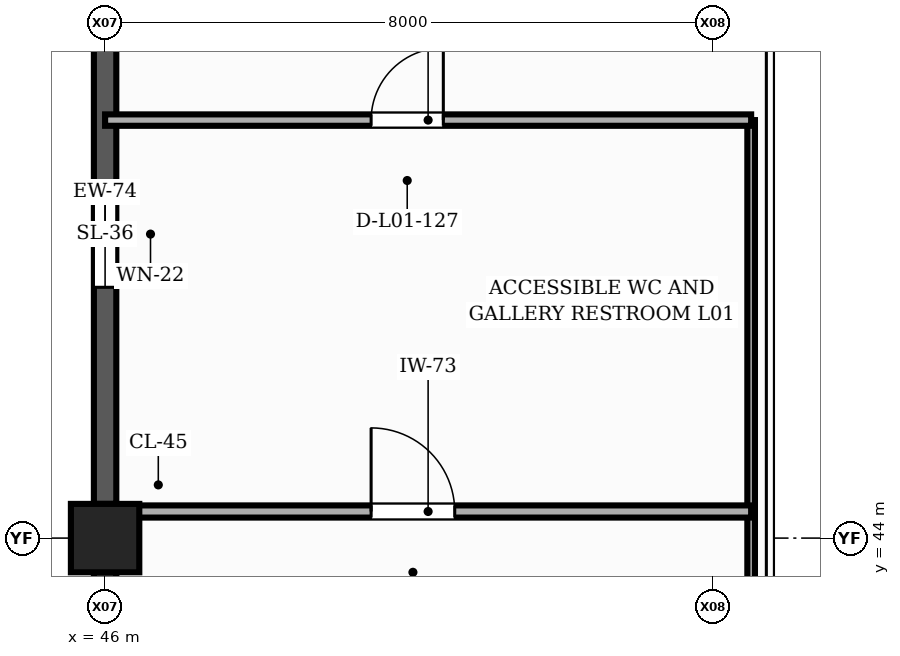
"""IFC4 building model, lengths in metres.
Left out: names, types, materials, properties, quantities, classifications, styles, units other than length and angle.
Written with IfcOpenShell. Run it as: python <this file> out.ifc"""

import sys

from ifc_helpers import new_model, si_unit, direction, frame, frame_2d, origin, origin_2d, place, context, subcontext, project, spatial, rectangle, extrude, element, fill, save


model = new_model("IFC4")
c1 = context("Model", 3, precision=1e-05, world=origin(), true_north=direction((0.0, 1.0)))
c2 = subcontext(c1, "Body", "Model", "MODEL_VIEW")
j1 = project(units=[si_unit("LENGTHUNIT", "METRE"), si_unit("PLANEANGLEUNIT", "RADIAN")], contexts=[c1])
p1 = place(None, origin())
s1 = spatial("IfcSite", under=j1, at=p1, CompositionType="ELEMENT")
p2 = place(p1, origin())
s2 = spatial("IfcBuilding", under=s1, at=p2, CompositionType="ELEMENT")
p3 = place(p2, frame((0.0, 0.0, 4.8)))
s3 = spatial("IfcBuildingStorey", under=s2, at=p3, CompositionType="ELEMENT", Elevation=4.8)
p4 = place(p3, frame((46.0, 44.0, 0.0), z_axis=(0.0, 0.0, 1.0), x_axis=(1.0, 0.0, 0.0)))
e1 = element("IfcColumn", 1, at=p4, inside=s3, PredefinedType="COLUMN", context=c2, shape_type="SweptSolid", body=[
    extrude(rectangle(XDim=0.9, YDim=0.9, at=origin_2d()), origin(), (0.0, 0.0, 1.0), 4.2),
])
p5 = place(p3, frame((46.0, 51.55, 0.0), z_axis=(0.0, 0.0, 1.0), x_axis=(0.0, -1.0, 0.0)))
e2 = element("IfcWall", 2, at=p5, inside=s3, PredefinedType="SOLIDWALL", context=c2, shape_type="SweptSolid", body=[
    extrude(rectangle(XDim=7.1, YDim=0.295, at=frame_2d((3.55, 0.0))), origin(), (0.0, 0.0, 1.0), 3.91),
])
p6 = place(p5, frame((2.85, 0.0, 0.9)))
e3 = element("IfcOpeningElement", 3, at=p6, cuts=e2, PredefinedType="OPENING", context=c2, shape_type="SweptSolid", body=[
    extrude(rectangle(XDim=1.4, YDim=1.4, at=frame_2d((0.7, 0.7))), frame((0.0, 0.157, 0.0), z_axis=(0.0, -1.0, 0.0), x_axis=(1.0, 0.0, 0.0)), (0.0, 0.0, 1.0), 0.315),
])
p7 = place(p3, frame((46.0, 43.55, 0.0), z_axis=(0.0, 0.0, 1.0), x_axis=(0.0, -1.0, 0.0)))
e4 = element("IfcWall", 4, at=p7, inside=s3, PredefinedType="SOLIDWALL", context=c2, shape_type="SweptSolid", body=[
    extrude(rectangle(XDim=7.1, YDim=0.295, at=frame_2d((3.55, 0.0))), origin(), (0.0, 0.0, 1.0), 3.91),
])
p8 = place(p7, frame((2.85, 0.0, 0.9)))
e5 = element("IfcOpeningElement", 5, at=p8, cuts=e4, PredefinedType="OPENING", context=c2, shape_type="SweptSolid", body=[
    extrude(rectangle(XDim=1.4, YDim=1.4, at=frame_2d((0.7, 0.7))), frame((0.0, 0.157, 0.0), z_axis=(0.0, -1.0, 0.0), x_axis=(1.0, 0.0, 0.0)), (0.0, 0.0, 1.0), 0.315),
])
p9 = place(p3, frame((54.5, 36.0, 0.0), z_axis=(0.0, 0.0, 1.0), x_axis=(0.0, 1.0, 0.0)))
e6 = element("IfcWall", 6, at=p9, inside=s3, PredefinedType="PARTITIONING", context=c2, shape_type="SweptSolid", body=[
    extrude(rectangle(XDim=13.5, YDim=0.1, at=frame_2d((6.75, 0.0))), origin(), (0.0, 0.0, 1.0), 2.945),
])
p10 = place(p3, frame((46.0, 44.35, 0.0), z_axis=(0.0, 0.0, 1.0), x_axis=(1.0, 0.0, 0.0)))
e7 = element("IfcWall", 7, at=p10, inside=s3, PredefinedType="PARTITIONING", context=c2, shape_type="SweptSolid", body=[
    extrude(rectangle(XDim=8.5, YDim=0.16, at=frame_2d((4.25, 0.0))), origin(), (0.0, 0.0, 1.0), 2.945),
])
p11 = place(p10, frame((3.5, 0.0, 0.0)))
e8 = element("IfcOpeningElement", 8, at=p11, cuts=e7, PredefinedType="OPENING", context=c2, shape_type="SweptSolid", body=[
    extrude(rectangle(XDim=1.1, YDim=2.1, at=frame_2d((0.55, 1.05))), frame((0.0, 0.09, 0.0), z_axis=(0.0, -1.0, 0.0), x_axis=(1.0, 0.0, 0.0)), (0.0, 0.0, 1.0), 0.18),
])
p12 = place(p3, frame((46.0, 49.5, 0.0), z_axis=(0.0, 0.0, 1.0), x_axis=(1.0, 0.0, 0.0)))
e9 = element("IfcWall", 9, at=p12, inside=s3, PredefinedType="PARTITIONING", context=c2, shape_type="SweptSolid", body=[
    extrude(rectangle(XDim=8.5, YDim=0.15, at=frame_2d((4.25, 0.0))), origin(), (0.0, 0.0, 1.0), 2.945),
])
p13 = place(p12, frame((3.5, 0.0, 0.0)))
e10 = element("IfcOpeningElement", 10, at=p13, cuts=e9, PredefinedType="OPENING", context=c2, shape_type="SweptSolid", body=[
    extrude(rectangle(XDim=0.95, YDim=2.15, at=frame_2d((0.475, 1.075))), frame((0.0, 0.085, 0.0), z_axis=(0.0, -1.0, 0.0), x_axis=(1.0, 0.0, 0.0)), (0.0, 0.0, 1.0), 0.17),
])
p14 = place(p6, origin())
e11 = element("IfcWindow", 11, at=p14, inside=s3, PartitioningType="SINGLE_PANEL", PredefinedType="WINDOW", context=c2, shape_type="SweptSolid", body=[
    extrude(rectangle(XDim=1.4, YDim=1.4, at=frame_2d((0.7, 0.7))), frame((0.0, 0.03, 0.0), z_axis=(0.0, -1.0, 0.0), x_axis=(1.0, 0.0, 0.0)), (0.0, 0.0, 1.0), 0.06),
])
fill(e3, e11)
p15 = place(p11, origin())
e12 = element("IfcDoor", 12, at=p15, inside=s3, OperationType="SINGLE_SWING_LEFT", PredefinedType="DOOR", context=c2, shape_type="SweptSolid", body=[
    extrude(rectangle(XDim=1.1, YDim=2.1, at=frame_2d((0.55, 1.05))), frame((0.0, 0.025, 0.0), z_axis=(0.0, -1.0, 0.0), x_axis=(1.0, 0.0, 0.0)), (0.0, 0.0, 1.0), 0.05),
])
fill(e8, e12)
p16 = place(p13, origin())
e13 = element("IfcDoor", 13, at=p16, inside=s3, OperationType="SINGLE_SWING_RIGHT", PredefinedType="DOOR", context=c2, shape_type="SweptSolid", body=[
    extrude(rectangle(XDim=0.95, YDim=2.15, at=frame_2d((0.475, 1.075))), frame((0.0, 0.025, 0.0), z_axis=(0.0, -1.0, 0.0), x_axis=(1.0, 0.0, 0.0)), (0.0, 0.0, 1.0), 0.05),
])
fill(e10, e13)
save(model, sys.argv[1])
